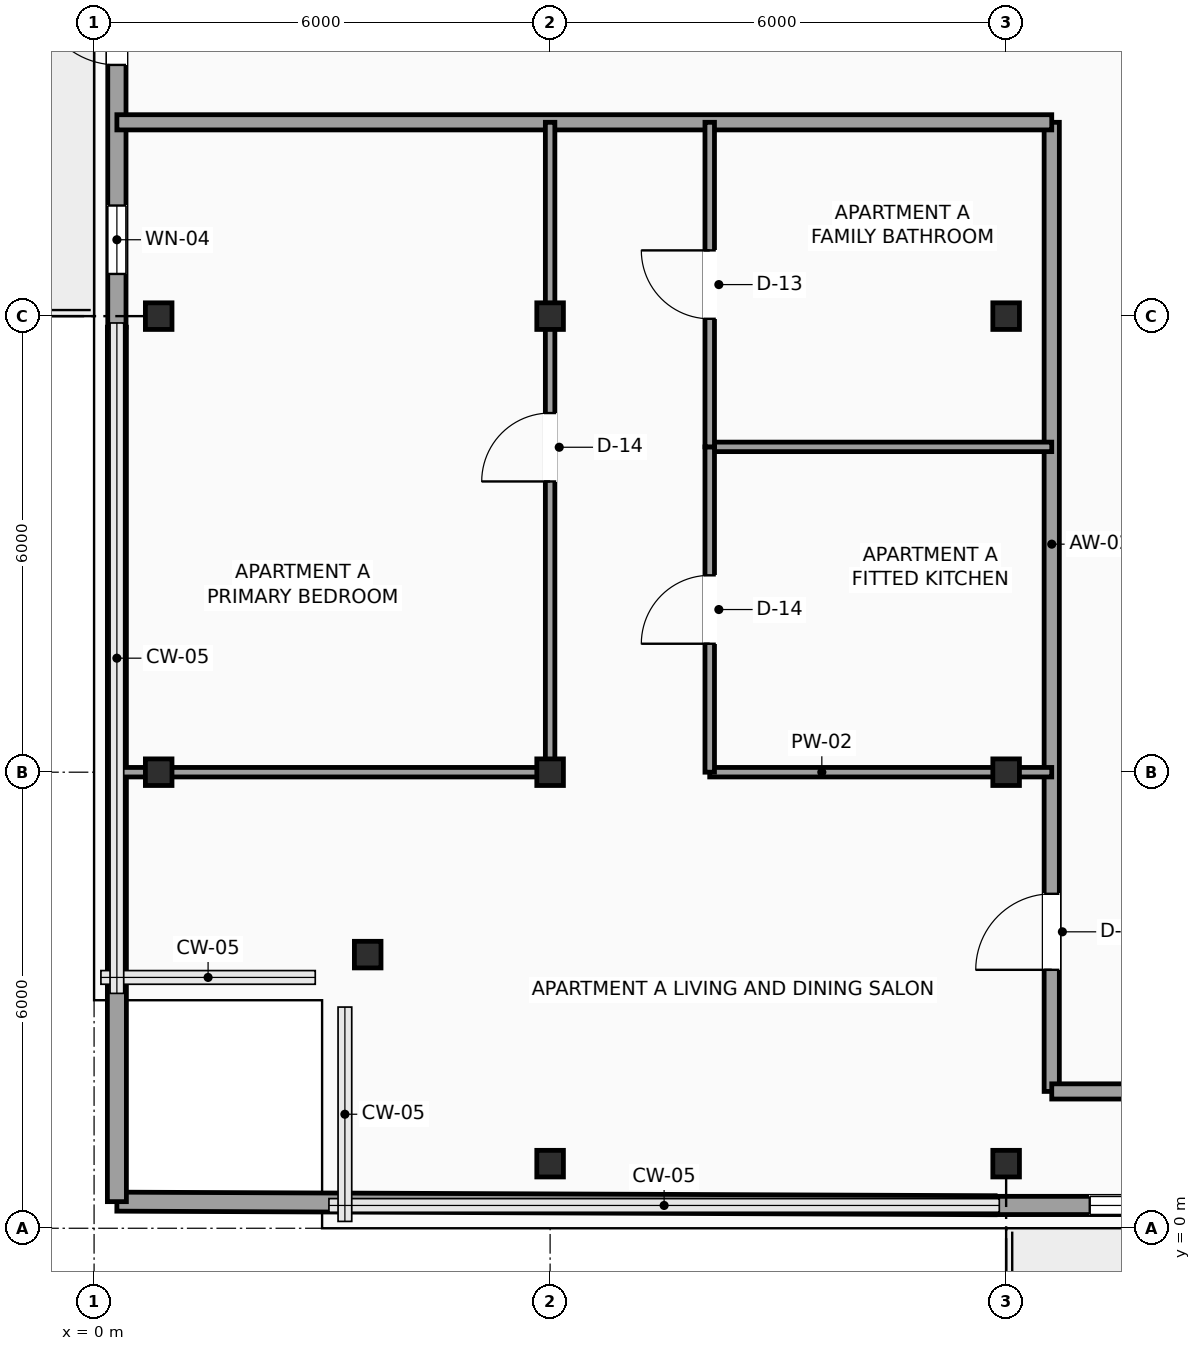
"""IFC4 building model, lengths in metres.
Left out: names, types, materials, properties, quantities, classifications, styles, units other than length and angle.
Written with IfcOpenShell. Run it as: python <this file> out.ifc"""

import sys

from ifc_helpers import new_model, si_unit, direction, frame, frame_2d, origin, origin_2d, place, context, subcontext, project, spatial, rectangle, hollow_rectangle, extrude, element, fill, save


model = new_model("IFC4")
c1 = context("Model", 3, precision=1e-05, world=origin(), true_north=direction((0.0, 1.0)))
c2 = subcontext(c1, "Body", "Model", "MODEL_VIEW")
j1 = project(units=[si_unit("LENGTHUNIT", "METRE"), si_unit("PLANEANGLEUNIT", "RADIAN")], contexts=[c1])
p1 = place(None, origin())
s1 = spatial("IfcSite", under=j1, at=p1, CompositionType="ELEMENT")
p2 = place(p1, origin())
s2 = spatial("IfcBuilding", under=s1, at=p2, CompositionType="ELEMENT")
p3 = place(p2, frame((0.0, 0.0, 239.7)))
s3 = spatial("IfcBuildingStorey", under=s2, at=p3, CompositionType="ELEMENT", Elevation=239.7)
for number, where, z_axis, x_axis in (
    (1, (3.6, 3.6, 0.0), (0.0, 0.0, 1.0), (1.0, 0.0, 0.0)),
    (2, (0.85, 6.0, 0.0), (0.0, 0.0, 1.0), (1.0, 0.0, 0.0)),
    (3, (0.85, 12.0, 0.0), (0.0, 0.0, 1.0), (1.0, 0.0, 0.0)),
    (4, (6.0, 0.85, 0.0), (0.0, 0.0, 1.0), (1.0, 0.0, 0.0)),
    (5, (6.0, 6.0, 0.0), (0.0, 0.0, 1.0), (1.0, 0.0, 0.0)),
    (6, (6.0, 12.0, 0.0), (0.0, 0.0, 1.0), (1.0, 0.0, 0.0)),
    (7, (12.0, 0.85, 0.0), (0.0, 0.0, 1.0), (1.0, 0.0, 0.0)),
    (8, (12.0, 6.0, 0.0), (0.0, 0.0, 1.0), (1.0, 0.0, 0.0)),
    (9, (12.0, 12.0, 0.0), (0.0, 0.0, 1.0), (1.0, 0.0, 0.0)),
):
    element("IfcColumn", number, at=place(p3, frame(where, z_axis=z_axis, x_axis=x_axis)), inside=s3, PredefinedType="COLUMN", context=c2, shape_type="SweptSolid", body=[
        extrude(hollow_rectangle(XDim=0.35, YDim=0.35, WallThickness=0.016, InnerFilletRadius=0.016, OuterFilletRadius=0.032, at=origin_2d()), origin(), (0.0, 0.0, 1.0), 3.5),
    ])
p4 = place(p3, frame((21.145, 0.3, 0.0), z_axis=(0.0, 0.0, 1.0), x_axis=(-1.0, 0.0, 0.0)))
e10 = element("IfcWall", 10, at=p4, inside=s3, PredefinedType="SOLIDWALL", context=c2, shape_type="SweptSolid", body=[
    extrude(rectangle(XDim=9.29, YDim=0.24, at=frame_2d((4.645, 0.0))), origin(), (0.0, 0.0, 1.0), 3.3),
])
p5 = place(p4, frame((3.945, 0.0, 0.0)))
e11 = element("IfcOpeningElement", 11, at=p5, cuts=e10, PredefinedType="OPENING", context=c2, shape_type="SweptSolid", body=[
    extrude(rectangle(XDim=1.05, YDim=2.2, at=frame_2d((0.525, 1.1))), frame((0.0, 0.13, 0.0), z_axis=(0.0, -1.0, 0.0), x_axis=(1.0, 0.0, 0.0)), (0.0, 0.0, 1.0), 0.26),
])
p6 = place(p4, frame((5.345, 0.0, 0.6)))
e12 = element("IfcOpeningElement", 12, at=p6, cuts=e10, PredefinedType="OPENING", context=c2, shape_type="SweptSolid", body=[
    extrude(rectangle(XDim=2.7, YDim=2.3, at=frame_2d((1.35, 1.15))), frame((0.0, 0.13, 0.0), z_axis=(0.0, -1.0, 0.0), x_axis=(1.0, 0.0, 0.0)), (0.0, 0.0, 1.0), 0.26),
])
p7 = place(p4, frame((1.4, 0.0, 0.6)))
e13 = element("IfcOpeningElement", 13, at=p7, cuts=e10, PredefinedType="OPENING", context=c2, shape_type="SweptSolid", body=[
    extrude(rectangle(XDim=0.9, YDim=2.2, at=frame_2d((0.45, 1.1))), frame((0.0, 0.13, 0.0), z_axis=(0.0, -1.0, 0.0), x_axis=(1.0, 0.0, 0.0)), (0.0, 0.0, 1.0), 0.26),
])
p8 = place(p3, frame((0.3, 11.855, 0.0), z_axis=(0.0, 0.0, 1.0), x_axis=(0.0, 1.0, 0.0)))
e14 = element("IfcWall", 14, at=p8, inside=s3, PredefinedType="SOLIDWALL", context=c2, shape_type="SweptSolid", body=[
    extrude(rectangle(XDim=9.29, YDim=0.24, at=frame_2d((4.645, 0.0))), origin(), (0.0, 0.0, 1.0), 3.3),
])
p9 = place(p8, frame((3.45, 0.0, 0.0)))
e15 = element("IfcOpeningElement", 15, at=p9, cuts=e14, PredefinedType="OPENING", context=c2, shape_type="SweptSolid", body=[
    extrude(rectangle(XDim=1.05, YDim=2.2, at=frame_2d((0.525, 1.1))), frame((0.0, 0.13, 0.0), z_axis=(0.0, -1.0, 0.0), x_axis=(1.0, 0.0, 0.0)), (0.0, 0.0, 1.0), 0.26),
])
p10 = place(p8, frame((5.6, 0.0, 0.6)))
e16 = element("IfcOpeningElement", 16, at=p10, cuts=e14, PredefinedType="OPENING", context=c2, shape_type="SweptSolid", body=[
    extrude(rectangle(XDim=2.7, YDim=2.3, at=frame_2d((1.35, 1.15))), frame((0.0, 0.13, 0.0), z_axis=(0.0, -1.0, 0.0), x_axis=(1.0, 0.0, 0.0)), (0.0, 0.0, 1.0), 0.26),
])
p11 = place(p8, frame((0.7, 0.0, 0.6)))
e17 = element("IfcOpeningElement", 17, at=p11, cuts=e14, PredefinedType="OPENING", context=c2, shape_type="SweptSolid", body=[
    extrude(rectangle(XDim=0.9, YDim=2.2, at=frame_2d((0.45, 1.1))), frame((0.0, 0.13, 0.0), z_axis=(0.0, -1.0, 0.0), x_axis=(1.0, 0.0, 0.0)), (0.0, 0.0, 1.0), 0.26),
])
p12 = place(p3, frame((12.6, 1.8, 0.0), z_axis=(0.0, 0.0, 1.0), x_axis=(0.0, 1.0, 0.0)))
e18 = element("IfcWall", 18, at=p12, inside=s3, PredefinedType="PARTITIONING", context=c2, shape_type="SweptSolid", body=[
    extrude(rectangle(XDim=12.75, YDim=0.2, at=frame_2d((6.375, 0.0))), origin(), (0.0, 0.0, 1.0), 3.3),
])
p13 = place(p12, frame((1.6, 0.0, 0.0)))
e19 = element("IfcOpeningElement", 19, at=p13, cuts=e18, PredefinedType="OPENING", context=c2, shape_type="SweptSolid", body=[
    extrude(rectangle(XDim=1.0, YDim=2.2, at=frame_2d((0.5, 1.1))), frame((0.0, 0.11, 0.0), z_axis=(0.0, -1.0, 0.0), x_axis=(1.0, 0.0, 0.0)), (0.0, 0.0, 1.0), 0.22),
])
p14 = place(p3, frame((12.6, 14.55, 0.0), z_axis=(0.0, 0.0, 1.0), x_axis=(-1.0, 0.0, 0.0)))
e20 = element("IfcWall", 20, at=p14, inside=s3, PredefinedType="PARTITIONING", context=c2, shape_type="SweptSolid", body=[
    extrude(rectangle(XDim=12.3, YDim=0.2, at=frame_2d((6.15, 0.0))), origin(), (0.0, 0.0, 1.0), 3.3),
])
p15 = place(p3, frame((14.95, 1.8, 0.0), z_axis=(0.0, 0.0, 1.0), x_axis=(-1.0, 0.0, 0.0)))
e21 = element("IfcWall", 21, at=p15, inside=s3, PredefinedType="PARTITIONING", context=c2, shape_type="SweptSolid", body=[
    extrude(rectangle(XDim=2.35, YDim=0.2, at=frame_2d((1.175, 0.0))), origin(), (0.0, 0.0, 1.0), 3.3),
])
p16 = place(p3, frame((0.3, 0.35, 0.0), z_axis=(0.0, 0.0, 1.0), x_axis=(0.999991685722, -0.004077804208, 0.0)))
e22 = element("IfcWall", 22, at=p16, inside=s3, PredefinedType="PARTITIONING", context=c2, shape_type="SweptSolid", body=[
    extrude(rectangle(XDim=11.555, YDim=0.25, at=frame_2d((5.777, 0.0))), origin(), (0.0, 0.0, 1.0), 3.3),
])
p17 = place(p3, frame((0.3, 0.35, 0.0), z_axis=(0.0, 0.0, 1.0), x_axis=(0.0, 1.0, 0.0)))
e23 = element("IfcWall", 23, at=p17, inside=s3, PredefinedType="PARTITIONING", context=c2, shape_type="SweptSolid", body=[
    extrude(rectangle(XDim=11.505, YDim=0.25, at=frame_2d((5.752, 0.0))), origin(), (0.0, 0.0, 1.0), 3.3),
])
p18 = place(p3, frame((8.1, 6.0, 0.0), z_axis=(0.0, 0.0, 1.0), x_axis=(1.0, 0.0, 0.0)))
e24 = element("IfcWall", 24, at=p18, inside=s3, PredefinedType="PARTITIONING", context=c2, shape_type="SweptSolid", body=[
    extrude(rectangle(XDim=4.5, YDim=0.125, at=frame_2d((2.25, 0.0))), origin(), (0.0, 0.0, 1.0), 2.992),
])
p19 = place(p3, frame((8.1, 10.28, 0.0), z_axis=(0.0, 0.0, 1.0), x_axis=(1.0, 0.0, 0.0)))
e25 = element("IfcWall", 25, at=p19, inside=s3, PredefinedType="PARTITIONING", context=c2, shape_type="SweptSolid", body=[
    extrude(rectangle(XDim=4.5, YDim=0.125, at=frame_2d((2.25, 0.0))), origin(), (0.0, 0.0, 1.0), 3.3),
])
p20 = place(p3, frame((8.1, 6.0, 0.0), z_axis=(0.0, 0.0, 1.0), x_axis=(0.0, 1.0, 0.0)))
e26 = element("IfcWall", 26, at=p20, inside=s3, PredefinedType="PARTITIONING", context=c2, shape_type="SweptSolid", body=[
    extrude(rectangle(XDim=4.28, YDim=0.125, at=frame_2d((2.14, 0.0))), origin(), (0.0, 0.0, 1.0), 3.3),
])
p21 = place(p20, frame((1.69, 0.0, 0.0)))
e27 = element("IfcOpeningElement", 27, at=p21, cuts=e26, PredefinedType="OPENING", context=c2, shape_type="SweptSolid", body=[
    extrude(rectangle(XDim=0.9, YDim=2.1, at=frame_2d((0.45, 1.05))), frame((0.0, 0.073, 0.0), z_axis=(0.0, -1.0, 0.0), x_axis=(1.0, 0.0, 0.0)), (0.0, 0.0, 1.0), 0.145),
])
p22 = place(p3, frame((8.1, 10.28, 0.0), z_axis=(0.0, 0.0, 1.0), x_axis=(0.0, 1.0, 0.0)))
e28 = element("IfcWall", 28, at=p22, inside=s3, PredefinedType="PARTITIONING", context=c2, shape_type="SweptSolid", body=[
    extrude(rectangle(XDim=4.27, YDim=0.125, at=frame_2d((2.135, 0.0))), origin(), (0.0, 0.0, 1.0), 3.3),
])
p23 = place(p22, frame((1.685, 0.0, 0.0)))
e29 = element("IfcOpeningElement", 29, at=p23, cuts=e28, PredefinedType="OPENING", context=c2, shape_type="SweptSolid", body=[
    extrude(rectangle(XDim=0.9, YDim=2.1, at=frame_2d((0.45, 1.05))), frame((0.0, 0.073, 0.0), z_axis=(0.0, -1.0, 0.0), x_axis=(1.0, 0.0, 0.0)), (0.0, 0.0, 1.0), 0.145),
])
p24 = place(p3, frame((0.3, 6.0, 0.0), z_axis=(0.0, 0.0, 1.0), x_axis=(1.0, 0.0, 0.0)))
e30 = element("IfcWall", 30, at=p24, inside=s3, PredefinedType="PARTITIONING", context=c2, shape_type="SweptSolid", body=[
    extrude(rectangle(XDim=5.7, YDim=0.125, at=frame_2d((2.85, 0.0))), origin(), (0.0, 0.0, 1.0), 2.992),
])
p25 = place(p3, frame((6.0, 6.0, 0.0), z_axis=(0.0, 0.0, 1.0), x_axis=(0.0, 1.0, 0.0)))
e31 = element("IfcWall", 31, at=p25, inside=s3, PredefinedType="PARTITIONING", context=c2, shape_type="SweptSolid", body=[
    extrude(rectangle(XDim=8.55, YDim=0.125, at=frame_2d((4.275, 0.0))), origin(), (0.0, 0.0, 1.0), 2.992),
])
p26 = place(p25, frame((3.825, 0.0, 0.0)))
e32 = element("IfcOpeningElement", 32, at=p26, cuts=e31, PredefinedType="OPENING", context=c2, shape_type="SweptSolid", body=[
    extrude(rectangle(XDim=0.9, YDim=2.1, at=frame_2d((0.45, 1.05))), frame((0.0, 0.073, 0.0), z_axis=(0.0, -1.0, 0.0), x_axis=(1.0, 0.0, 0.0)), (0.0, 0.0, 1.0), 0.145),
])
p27 = place(p6, origin())
e33 = element("IfcWindow", 33, at=p27, inside=s3, PartitioningType="SINGLE_PANEL", PredefinedType="WINDOW", context=c2, shape_type="SweptSolid", body=[
    extrude(rectangle(XDim=2.7, YDim=2.3, at=frame_2d((1.35, 1.15))), frame((0.0, 0.03, 0.0), z_axis=(0.0, -1.0, 0.0), x_axis=(1.0, 0.0, 0.0)), (0.0, 0.0, 1.0), 0.06),
])
fill(e12, e33)
p28 = place(p9, origin())
e34 = element("IfcDoor", 34, at=p28, inside=s3, OperationType="SINGLE_SWING_RIGHT", PredefinedType="DOOR", context=c2, shape_type="SweptSolid", body=[
    extrude(rectangle(XDim=1.05, YDim=2.2, at=frame_2d((0.525, 1.1))), frame((0.0, 0.025, 0.0), z_axis=(0.0, -1.0, 0.0), x_axis=(1.0, 0.0, 0.0)), (0.0, 0.0, 1.0), 0.05),
])
fill(e15, e34)
p29 = place(p11, origin())
e35 = element("IfcWindow", 35, at=p29, inside=s3, PartitioningType="SINGLE_PANEL", PredefinedType="WINDOW", context=c2, shape_type="SweptSolid", body=[
    extrude(rectangle(XDim=0.9, YDim=2.2, at=frame_2d((0.45, 1.1))), frame((0.0, 0.03, 0.0), z_axis=(0.0, -1.0, 0.0), x_axis=(1.0, 0.0, 0.0)), (0.0, 0.0, 1.0), 0.06),
])
fill(e17, e35)
p30 = place(p13, origin())
e36 = element("IfcDoor", 36, at=p30, inside=s3, OperationType="SINGLE_SWING_LEFT", PredefinedType="DOOR", context=c2, shape_type="SweptSolid", body=[
    extrude(rectangle(XDim=1.0, YDim=2.2, at=frame_2d((0.5, 1.1))), frame((0.0, 0.025, 0.0), z_axis=(0.0, -1.0, 0.0), x_axis=(1.0, 0.0, 0.0)), (0.0, 0.0, 1.0), 0.05),
])
fill(e19, e36)
p31 = place(p21, origin())
e37 = element("IfcDoor", 37, at=p31, inside=s3, OperationType="SINGLE_SWING_LEFT", PredefinedType="DOOR", context=c2, shape_type="SweptSolid", body=[
    extrude(rectangle(XDim=0.9, YDim=2.1, at=frame_2d((0.45, 1.05))), frame((0.0, 0.025, 0.0), z_axis=(0.0, -1.0, 0.0), x_axis=(1.0, 0.0, 0.0)), (0.0, 0.0, 1.0), 0.05),
])
fill(e27, e37)
p32 = place(p23, origin())
e38 = element("IfcDoor", 38, at=p32, inside=s3, OperationType="SINGLE_SWING_RIGHT", PredefinedType="DOOR", context=c2, shape_type="SweptSolid", body=[
    extrude(rectangle(XDim=0.9, YDim=2.1, at=frame_2d((0.45, 1.05))), frame((0.0, 0.025, 0.0), z_axis=(0.0, -1.0, 0.0), x_axis=(1.0, 0.0, 0.0)), (0.0, 0.0, 1.0), 0.05),
])
fill(e29, e38)
p33 = place(p26, origin())
e39 = element("IfcDoor", 39, at=p33, inside=s3, OperationType="SINGLE_SWING_LEFT", PredefinedType="DOOR", context=c2, shape_type="SweptSolid", body=[
    extrude(rectangle(XDim=0.9, YDim=2.1, at=frame_2d((0.45, 1.05))), frame((0.0, 0.025, 0.0), z_axis=(0.0, -1.0, 0.0), x_axis=(1.0, 0.0, 0.0)), (0.0, 0.0, 1.0), 0.05),
])
fill(e32, e39)
save(model, sys.argv[1])
